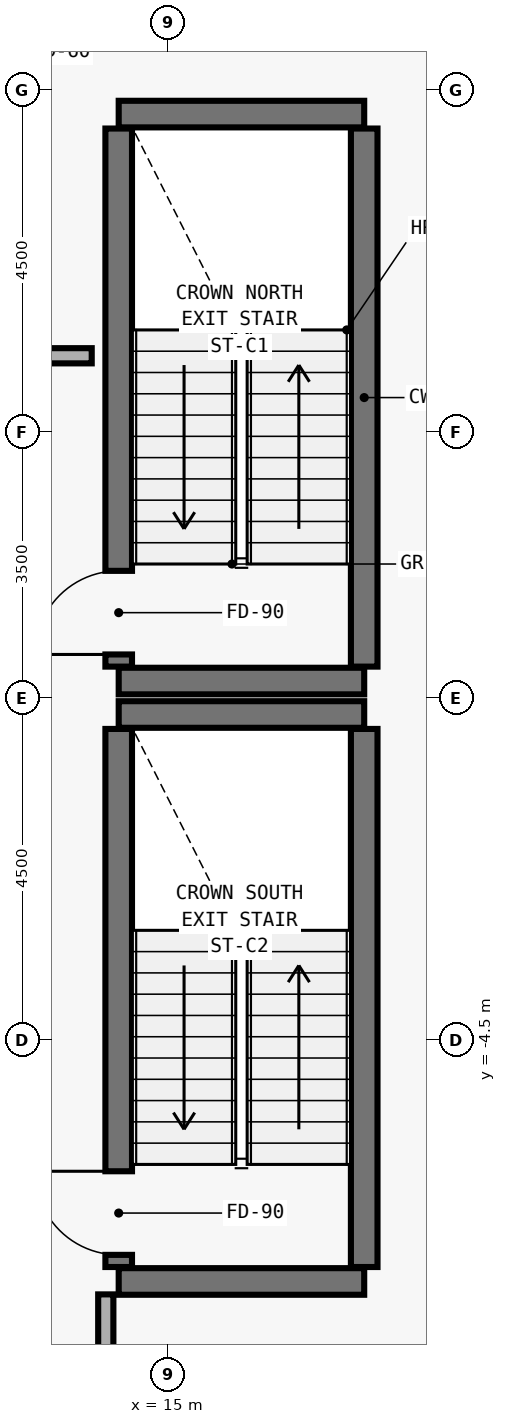
"""IFC4 building model, lengths in metres.
Left out: names, types, materials, properties, quantities, classifications, styles, units other than length and angle.
Written with IfcOpenShell. Run it as: python <this file> out.ifc"""

import sys

from ifc_helpers import new_model, si_unit, direction, frame, frame_2d, origin, place, context, subcontext, project, spatial, rectangle, extrude, element, fill, save


model = new_model("IFC4")
c1 = context("Model", 3, precision=1e-05, world=origin(), true_north=direction((0.0, 1.0)))
c2 = subcontext(c1, "Body", "Model", "MODEL_VIEW")
j1 = project(units=[si_unit("LENGTHUNIT", "METRE"), si_unit("PLANEANGLEUNIT", "RADIAN")], contexts=[c1])
p1 = place(None, origin())
s1 = spatial("IfcSite", under=j1, at=p1, CompositionType="ELEMENT")
p2 = place(p1, origin())
s2 = spatial("IfcBuilding", under=s1, at=p2, CompositionType="ELEMENT")
p3 = place(p2, frame((0.0, 0.0, 294.0)))
s3 = spatial("IfcBuildingStorey", under=s2, at=p3, CompositionType="ELEMENT", Elevation=294.0)
for number, where, z_axis, x_axis in (
    (1, (14.35, 0.22, 0.0), (0.0, 0.0, 1.0), (1.0, 0.0, 0.0)),
    (2, (14.35, 7.68, 0.0), (0.0, 0.0, 1.0), (1.0, 0.0, 0.0)),
):
    element("IfcWall", number, at=place(p3, frame(where, z_axis=z_axis, x_axis=x_axis)), inside=s3, PredefinedType="SHEAR", context=c2, shape_type="SweptSolid", body=[
        extrude(rectangle(XDim=3.23, YDim=0.35, at=frame_2d((1.615, 0.0))), origin(), (0.0, 0.0, 1.0), 4.192),
    ])
p4 = place(p3, frame((14.35, 0.41, 0.0), z_axis=(0.0, 0.0, 1.0), x_axis=(0.0, 1.0, 0.0)))
e3 = element("IfcWall", 3, at=p4, inside=s3, PredefinedType="SHEAR", context=c2, shape_type="SweptSolid", body=[
    extrude(rectangle(XDim=7.08, YDim=0.35, at=frame_2d((3.54, 0.0))), origin(), (0.0, 0.0, 1.0), 4.192),
])
p5 = place(p4, frame((0.16, 0.0, 0.0)))
e4 = element("IfcOpeningElement", 4, at=p5, cuts=e3, PredefinedType="OPENING", context=c2, shape_type="SweptSolid", body=[
    extrude(rectangle(XDim=1.1, YDim=2.15, at=frame_2d((0.55, 1.075))), frame((0.0, 0.185, 0.0), z_axis=(0.0, -1.0, 0.0), x_axis=(1.0, 0.0, 0.0)), (0.0, 0.0, 1.0), 0.37),
])
p6 = place(p3, frame((17.58, 0.41, 0.0), z_axis=(0.0, 0.0, 1.0), x_axis=(0.0, 1.0, 0.0)))
e5 = element("IfcWall", 5, at=p6, inside=s3, PredefinedType="SHEAR", context=c2, shape_type="SweptSolid", body=[
    extrude(rectangle(XDim=7.08, YDim=0.35, at=frame_2d((3.54, 0.0))), origin(), (0.0, 0.0, 1.0), 4.192),
])
for number, where, z_axis, x_axis in (
    (6, (14.35, -7.68, 0.0), (0.0, 0.0, 1.0), (1.0, 0.0, 0.0)),
    (7, (14.35, -0.22, 0.0), (0.0, 0.0, 1.0), (1.0, 0.0, 0.0)),
):
    element("IfcWall", number, at=place(p3, frame(where, z_axis=z_axis, x_axis=x_axis)), inside=s3, PredefinedType="SHEAR", context=c2, shape_type="SweptSolid", body=[
        extrude(rectangle(XDim=3.23, YDim=0.35, at=frame_2d((1.615, 0.0))), origin(), (0.0, 0.0, 1.0), 4.192),
    ])
p7 = place(p3, frame((14.35, -7.49, 0.0), z_axis=(0.0, 0.0, 1.0), x_axis=(0.0, 1.0, 0.0)))
e8 = element("IfcWall", 8, at=p7, inside=s3, PredefinedType="SHEAR", context=c2, shape_type="SweptSolid", body=[
    extrude(rectangle(XDim=7.08, YDim=0.35, at=frame_2d((3.54, 0.0))), origin(), (0.0, 0.0, 1.0), 4.192),
])
p8 = place(p7, frame((0.16, 0.0, 0.0)))
e9 = element("IfcOpeningElement", 9, at=p8, cuts=e8, PredefinedType="OPENING", context=c2, shape_type="SweptSolid", body=[
    extrude(rectangle(XDim=1.1, YDim=2.15, at=frame_2d((0.55, 1.075))), frame((0.0, 0.185, 0.0), z_axis=(0.0, -1.0, 0.0), x_axis=(1.0, 0.0, 0.0)), (0.0, 0.0, 1.0), 0.37),
])
p9 = place(p3, frame((17.58, -7.49, 0.0), z_axis=(0.0, 0.0, 1.0), x_axis=(0.0, 1.0, 0.0)))
e10 = element("IfcWall", 10, at=p9, inside=s3, PredefinedType="SHEAR", context=c2, shape_type="SweptSolid", body=[
    extrude(rectangle(XDim=7.08, YDim=0.35, at=frame_2d((3.54, 0.0))), origin(), (0.0, 0.0, 1.0), 4.192),
])
p10 = place(p3, frame((13.995, 4.5, 0.0), z_axis=(0.0, 0.0, 1.0), x_axis=(-1.0, 0.0, 0.0)))
e11 = element("IfcWall", 11, at=p10, inside=s3, PredefinedType="MOVABLE", context=c2, shape_type="SweptSolid", body=[
    extrude(rectangle(XDim=2.085, YDim=0.2, at=frame_2d((1.042, 0.0))), origin(), (0.0, 0.0, 1.0), 3.96),
])
p11 = place(p3, frame((14.18, -8.69, 0.0), z_axis=(0.0, 0.0, 1.0), x_axis=(0.0, 1.0, 0.0)))
e12 = element("IfcWall", 12, at=p11, inside=s3, PredefinedType="MOVABLE", context=c2, shape_type="SweptSolid", body=[
    extrude(rectangle(XDim=0.84, YDim=0.2, at=frame_2d((0.42, 0.0))), origin(), (0.0, 0.0, 1.0), 3.96),
])
p12 = place(p5, origin())
e13 = element("IfcDoor", 13, at=p12, inside=s3, OperationType="SINGLE_SWING_LEFT", PredefinedType="DOOR", context=c2, shape_type="SweptSolid", body=[
    extrude(rectangle(XDim=1.1, YDim=2.15, at=frame_2d((0.55, 1.075))), frame((0.0, 0.025, 0.0), z_axis=(0.0, -1.0, 0.0), x_axis=(1.0, 0.0, 0.0)), (0.0, 0.0, 1.0), 0.05),
])
fill(e4, e13)
p13 = place(p8, origin())
e14 = element("IfcDoor", 14, at=p13, inside=s3, OperationType="SINGLE_SWING_RIGHT", PredefinedType="DOOR", context=c2, shape_type="SweptSolid", body=[
    extrude(rectangle(XDim=1.1, YDim=2.15, at=frame_2d((0.55, 1.075))), frame((0.0, 0.025, 0.0), z_axis=(0.0, -1.0, 0.0), x_axis=(1.0, 0.0, 0.0)), (0.0, 0.0, 1.0), 0.05),
])
fill(e9, e14)
save(model, sys.argv[1])
